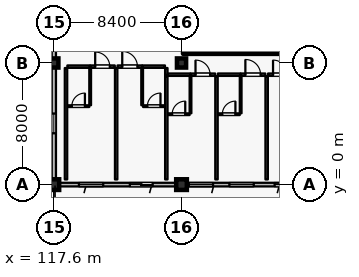
"""IFC4 building model, lengths in metres.
Left out: names, types, materials, properties, quantities, classifications, styles, units other than length and angle.
Written with IfcOpenShell. Run it as: python <this file> out.ifc"""

import sys

from ifc_helpers import new_model, si_unit, direction, frame, frame_2d, origin, origin_2d, place, context, subcontext, project, spatial, rectangle, hollow_rectangle, extrude, element, fill, save


model = new_model("IFC4")
c1 = context("Model", 3, precision=1e-05, world=origin(), true_north=direction((0.0, 1.0)))
c2 = subcontext(c1, "Body", "Model", "MODEL_VIEW")
j1 = project(units=[si_unit("LENGTHUNIT", "METRE"), si_unit("PLANEANGLEUNIT", "RADIAN")], contexts=[c1])
p1 = place(None, origin())
s1 = spatial("IfcSite", under=j1, at=p1, CompositionType="ELEMENT")
p2 = place(p1, origin())
s2 = spatial("IfcBuilding", under=s1, at=p2, CompositionType="ELEMENT")
p3 = place(p2, frame((0.0, 0.0, 32.4)))
s3 = spatial("IfcBuildingStorey", under=s2, at=p3, CompositionType="ELEMENT", Elevation=32.4)
for number, where, z_axis, x_axis in (
    (1, (117.6, 0.0, 0.0), (0.0, 0.0, 1.0), (1.0, 0.0, 0.0)),
    (2, (126.0, 0.0, 0.0), (0.0, 0.0, 1.0), (1.0, 0.0, 0.0)),
):
    element("IfcColumn", number, at=place(p3, frame(where, z_axis=z_axis, x_axis=x_axis)), inside=s3, PredefinedType="COLUMN", context=c2, shape_type="SweptSolid", body=[
        extrude(rectangle(XDim=0.7, YDim=0.7, at=origin_2d()), origin(), (0.0, 0.0, 1.0), 3.6),
    ])
for number, where, z_axis, x_axis in (
    (3, (117.6, 8.0, 0.0), (0.0, 0.0, 1.0), (1.0, 0.0, 0.0)),
    (4, (126.0, 8.0, 0.0), (0.0, 0.0, 1.0), (1.0, 0.0, 0.0)),
):
    element("IfcColumn", number, at=place(p3, frame(where, z_axis=z_axis, x_axis=x_axis)), inside=s3, PredefinedType="COLUMN", context=c2, shape_type="SweptSolid", body=[
        extrude(rectangle(XDim=0.6, YDim=0.6, at=origin_2d()), origin(), (0.0, 0.0, 1.0), 3.6),
    ])
p4 = place(p3, frame((125.65, 0.0, 0.0), z_axis=(0.0, 0.0, 1.0), x_axis=(-1.0, 0.0, 0.0)))
e5 = element("IfcWall", 5, at=p4, inside=s3, PredefinedType="SOLIDWALL", context=c2, shape_type="SweptSolid", body=[
    extrude(rectangle(XDim=7.7, YDim=0.24, at=frame_2d((3.85, 0.0))), origin(), (0.0, 0.0, 1.0), 2.94),
])
p5 = place(p4, frame((1.55, 0.0, 0.0)))
e6 = element("IfcOpeningElement", 6, at=p5, cuts=e5, PredefinedType="OPENING", context=c2, shape_type="SweptSolid", body=[
    extrude(rectangle(XDim=1.5, YDim=2.25, at=frame_2d((0.75, 1.125))), frame((0.0, 0.13, 0.0), z_axis=(0.0, -1.0, 0.0), x_axis=(1.0, 0.0, 0.0)), (0.0, 0.0, 1.0), 0.26),
])
p6 = place(p4, frame((4.8, 0.0, 0.8)))
e7 = element("IfcOpeningElement", 7, at=p6, cuts=e5, PredefinedType="OPENING", context=c2, shape_type="SweptSolid", body=[
    extrude(rectangle(XDim=1.6, YDim=1.6, at=frame_2d((0.8, 0.8))), frame((0.0, 0.13, 0.0), z_axis=(0.0, -1.0, 0.0), x_axis=(1.0, 0.0, 0.0)), (0.0, 0.0, 1.0), 0.26),
])
p7 = place(p3, frame((134.05, 0.0, 0.0), z_axis=(0.0, 0.0, 1.0), x_axis=(-1.0, 0.0, 0.0)))
e8 = element("IfcWall", 8, at=p7, inside=s3, PredefinedType="SOLIDWALL", context=c2, shape_type="SweptSolid", body=[
    extrude(rectangle(XDim=7.7, YDim=0.24, at=frame_2d((3.85, 0.0))), origin(), (0.0, 0.0, 1.0), 2.94),
])
p8 = place(p7, frame((0.425, 0.0, 0.0)))
e9 = element("IfcOpeningElement", 9, at=p8, cuts=e8, PredefinedType="OPENING", context=c2, shape_type="SweptSolid", body=[
    extrude(rectangle(XDim=1.5, YDim=2.25, at=frame_2d((0.75, 1.125))), frame((0.0, 0.13, 0.0), z_axis=(0.0, -1.0, 0.0), x_axis=(1.0, 0.0, 0.0)), (0.0, 0.0, 1.0), 0.26),
])
p9 = place(p7, frame((3.3, 0.0, 0.8)))
e10 = element("IfcOpeningElement", 10, at=p9, cuts=e8, PredefinedType="OPENING", context=c2, shape_type="SweptSolid", body=[
    extrude(rectangle(XDim=1.6, YDim=1.6, at=frame_2d((0.8, 0.8))), frame((0.0, 0.13, 0.0), z_axis=(0.0, -1.0, 0.0), x_axis=(1.0, 0.0, 0.0)), (0.0, 0.0, 1.0), 0.26),
])
p10 = place(p7, frame((5.975, 0.0, 0.8)))
e11 = element("IfcOpeningElement", 11, at=p10, cuts=e8, PredefinedType="OPENING", context=c2, shape_type="SweptSolid", body=[
    extrude(rectangle(XDim=1.6, YDim=1.6, at=frame_2d((0.8, 0.8))), frame((0.0, 0.13, 0.0), z_axis=(0.0, -1.0, 0.0), x_axis=(1.0, 0.0, 0.0)), (0.0, 0.0, 1.0), 0.26),
])
p11 = place(p3, frame((117.6, 0.35, 0.0), z_axis=(0.0, 0.0, 1.0), x_axis=(0.0, 1.0, 0.0)))
e12 = element("IfcWall", 12, at=p11, inside=s3, PredefinedType="SOLIDWALL", context=c2, shape_type="SweptSolid", body=[
    extrude(rectangle(XDim=7.35, YDim=0.28, at=frame_2d((3.675, 0.0))), origin(), (0.0, 0.0, 1.0), 2.7),
])
p12 = place(p11, frame((3.025, 0.0, 0.5)))
e13 = element("IfcOpeningElement", 13, at=p12, cuts=e12, PredefinedType="OPENING", context=c2, shape_type="SweptSolid", body=[
    extrude(rectangle(XDim=1.3, YDim=1.65, at=frame_2d((0.65, 0.825))), frame((0.0, 0.15, 0.0), z_axis=(0.0, -1.0, 0.0), x_axis=(1.0, 0.0, 0.0)), (0.0, 0.0, 1.0), 0.3),
])
p13 = place(p3, frame((117.6, 8.3, 0.0), z_axis=(0.0, 0.0, 1.0), x_axis=(0.0, 1.0, 0.0)))
e14 = element("IfcWall", 14, at=p13, inside=s3, PredefinedType="SOLIDWALL", context=c2, shape_type="SweptSolid", body=[
    extrude(rectangle(XDim=7.35, YDim=0.28, at=frame_2d((3.675, 0.0))), origin(), (0.0, 0.0, 1.0), 2.7),
])
p14 = place(p13, frame((3.025, 0.0, 0.5)))
e15 = element("IfcOpeningElement", 15, at=p14, cuts=e14, PredefinedType="OPENING", context=c2, shape_type="SweptSolid", body=[
    extrude(rectangle(XDim=1.3, YDim=1.65, at=frame_2d((0.65, 0.825))), frame((0.0, 0.15, 0.0), z_axis=(0.0, -1.0, 0.0), x_axis=(1.0, 0.0, 0.0)), (0.0, 0.0, 1.0), 0.3),
])
p15 = place(p3, frame((126.1, 8.8, 0.0), z_axis=(0.0, 0.0, 1.0), x_axis=(1.0, 0.0, 0.0)))
e16 = element("IfcWall", 16, at=p15, inside=s3, PredefinedType="SHEAR", context=c2, shape_type="SweptSolid", body=[
    extrude(rectangle(XDim=8.2, YDim=0.4, at=frame_2d((4.1, 0.0))), origin(), (0.0, 0.0, 1.0), 3.335),
])
for number, where, z_axis, x_axis in (
    (17, (126.48, 8.8, 0.0), (0.0, 0.0, 1.0), (1.0, 0.0, 0.0)),
    (18, (127.74, 8.8, 0.0), (0.0, 0.0, 1.0), (1.0, 0.0, 0.0)),
):
    element("IfcColumn", number, at=place(p3, frame(where, z_axis=z_axis, x_axis=x_axis)), inside=s3, PredefinedType="COLUMN", context=c2, shape_type="SweptSolid", body=[
        extrude(hollow_rectangle(XDim=0.3, YDim=0.3, WallThickness=0.012, at=origin_2d()), origin(), (0.0, 0.0, 1.0), 3.42),
    ])
p16 = place(p3, frame((118.49, 7.76, 0.0), z_axis=(0.0, 0.0, 1.0), x_axis=(1.0, 0.0, 0.0)))
e19 = element("IfcWall", 19, at=p16, inside=s3, PredefinedType="PARTITIONING", context=c2, shape_type="SweptSolid", body=[
    extrude(rectangle(XDim=1.49, YDim=0.16, at=frame_2d((0.745, 0.0))), origin(), (0.0, 0.0, 1.0), 3.335),
])
p17 = place(p3, frame((119.99, 7.76, 0.0), z_axis=(0.0, 0.0, 1.0), x_axis=(1.0, 0.0, 0.0)))
e20 = element("IfcWall", 20, at=p17, inside=s3, PredefinedType="PARTITIONING", context=c2, shape_type="SweptSolid", body=[
    extrude(rectangle(XDim=1.62, YDim=0.16, at=frame_2d((0.81, 0.0))), origin(), (0.0, 0.0, 1.0), 3.335),
])
p18 = place(p17, frame((0.33, 0.0, 0.0)))
e21 = element("IfcOpeningElement", 21, at=p18, cuts=e20, PredefinedType="OPENING", context=c2, shape_type="SweptSolid", body=[
    extrude(rectangle(XDim=0.96, YDim=2.2, at=frame_2d((0.48, 1.1))), frame((0.0, 0.09, 0.0), z_axis=(0.0, -1.0, 0.0), x_axis=(1.0, 0.0, 0.0)), (0.0, 0.0, 1.0), 0.18),
])
p19 = place(p3, frame((119.99, 5.22, 0.0), z_axis=(0.0, 0.0, 1.0), x_axis=(0.0, 1.0, 0.0)))
e22 = element("IfcWall", 22, at=p19, inside=s3, PredefinedType="PARTITIONING", context=c2, shape_type="SweptSolid", body=[
    extrude(rectangle(XDim=2.45, YDim=0.115, at=frame_2d((1.225, 0.0))), origin(), (0.0, 0.0, 1.0), 3.335),
])
p20 = place(p3, frame((118.5, 5.16, 0.0), z_axis=(0.0, 0.0, 1.0), x_axis=(1.0, 0.0, 0.0)))
e23 = element("IfcWall", 23, at=p20, inside=s3, PredefinedType="PARTITIONING", context=c2, shape_type="SweptSolid", body=[
    extrude(rectangle(XDim=1.43, YDim=0.115, at=frame_2d((0.715, 0.0))), origin(), (0.0, 0.0, 1.0), 3.335),
])
p21 = place(p20, frame((0.285, 0.0, 0.0)))
e24 = element("IfcOpeningElement", 24, at=p21, cuts=e23, PredefinedType="OPENING", context=c2, shape_type="SweptSolid", body=[
    extrude(rectangle(XDim=0.86, YDim=2.12, at=frame_2d((0.43, 1.06))), frame((0.0, 0.067, 0.0), z_axis=(0.0, -1.0, 0.0), x_axis=(1.0, 0.0, 0.0)), (0.0, 0.0, 1.0), 0.135),
])
p22 = place(p3, frame((118.4, 0.34, 0.0), z_axis=(0.0, 0.0, 1.0), x_axis=(0.0, 1.0, 0.0)))
e25 = element("IfcWall", 25, at=p22, inside=s3, PredefinedType="PARTITIONING", context=c2, shape_type="SweptSolid", body=[
    extrude(rectangle(XDim=7.33, YDim=0.16, at=frame_2d((3.665, 0.0))), origin(), (0.0, 0.0, 1.0), 3.335),
])
p23 = place(p3, frame((121.79, 7.76, 0.0), z_axis=(0.0, 0.0, 1.0), x_axis=(1.0, 0.0, 0.0)))
e26 = element("IfcWall", 26, at=p23, inside=s3, PredefinedType="PARTITIONING", context=c2, shape_type="SweptSolid", body=[
    extrude(rectangle(XDim=1.62, YDim=0.16, at=frame_2d((0.81, 0.0))), origin(), (0.0, 0.0, 1.0), 3.335),
])
p24 = place(p23, frame((0.31, 0.0, 0.0)))
e27 = element("IfcOpeningElement", 27, at=p24, cuts=e26, PredefinedType="OPENING", context=c2, shape_type="SweptSolid", body=[
    extrude(rectangle(XDim=1.0, YDim=2.25, at=frame_2d((0.5, 1.125))), frame((0.0, 0.09, 0.0), z_axis=(0.0, -1.0, 0.0), x_axis=(1.0, 0.0, 0.0)), (0.0, 0.0, 1.0), 0.18),
])
p25 = place(p3, frame((123.42, 7.76, 0.0), z_axis=(0.0, 0.0, 1.0), x_axis=(1.0, 0.0, 0.0)))
e28 = element("IfcWall", 28, at=p25, inside=s3, PredefinedType="PARTITIONING", context=c2, shape_type="SweptSolid", body=[
    extrude(rectangle(XDim=1.49, YDim=0.16, at=frame_2d((0.745, 0.0))), origin(), (0.0, 0.0, 1.0), 3.335),
])
p26 = place(p3, frame((123.41, 5.22, 0.0), z_axis=(0.0, 0.0, 1.0), x_axis=(0.0, 1.0, 0.0)))
e29 = element("IfcWall", 29, at=p26, inside=s3, PredefinedType="PARTITIONING", context=c2, shape_type="SweptSolid", body=[
    extrude(rectangle(XDim=2.45, YDim=0.115, at=frame_2d((1.225, 0.0))), origin(), (0.0, 0.0, 1.0), 3.335),
])
p27 = place(p3, frame((123.47, 5.16, 0.0), z_axis=(0.0, 0.0, 1.0), x_axis=(1.0, 0.0, 0.0)))
e30 = element("IfcWall", 30, at=p27, inside=s3, PredefinedType="PARTITIONING", context=c2, shape_type="SweptSolid", body=[
    extrude(rectangle(XDim=1.43, YDim=0.115, at=frame_2d((0.715, 0.0))), origin(), (0.0, 0.0, 1.0), 3.335),
])
p28 = place(p27, frame((0.285, 0.0, 0.0)))
e31 = element("IfcOpeningElement", 31, at=p28, cuts=e30, PredefinedType="OPENING", context=c2, shape_type="SweptSolid", body=[
    extrude(rectangle(XDim=0.86, YDim=2.12, at=frame_2d((0.43, 1.06))), frame((0.0, 0.067, 0.0), z_axis=(0.0, -1.0, 0.0), x_axis=(1.0, 0.0, 0.0)), (0.0, 0.0, 1.0), 0.135),
])
p29 = place(p3, frame((121.7, 0.34, 0.0), z_axis=(0.0, 0.0, 1.0), x_axis=(0.0, 1.0, 0.0)))
e32 = element("IfcWall", 32, at=p29, inside=s3, PredefinedType="PARTITIONING", context=c2, shape_type="SweptSolid", body=[
    extrude(rectangle(XDim=7.33, YDim=0.16, at=frame_2d((3.665, 0.0))), origin(), (0.0, 0.0, 1.0), 3.335),
])
p30 = place(p3, frame((125.0, 7.15, 0.0), z_axis=(0.0, 0.0, 1.0), x_axis=(0.0, 1.0, 0.0)))
e33 = element("IfcWall", 33, at=p30, inside=s3, PredefinedType="PARTITIONING", context=c2, shape_type="SweptSolid", body=[
    extrude(rectangle(XDim=0.52, YDim=0.16, at=frame_2d((0.26, 0.0))), origin(), (0.0, 0.0, 1.0), 3.335),
])
p31 = place(p3, frame((125.09, 7.23, 0.0), z_axis=(0.0, 0.0, 1.0), x_axis=(1.0, 0.0, 0.0)))
e34 = element("IfcWall", 34, at=p31, inside=s3, PredefinedType="PARTITIONING", context=c2, shape_type="SweptSolid", body=[
    extrude(rectangle(XDim=1.49, YDim=0.16, at=frame_2d((0.745, 0.0))), origin(), (0.0, 0.0, 1.0), 3.335),
])
p32 = place(p3, frame((126.59, 7.23, 0.0), z_axis=(0.0, 0.0, 1.0), x_axis=(1.0, 0.0, 0.0)))
e35 = element("IfcWall", 35, at=p32, inside=s3, PredefinedType="PARTITIONING", context=c2, shape_type="SweptSolid", body=[
    extrude(rectangle(XDim=1.62, YDim=0.16, at=frame_2d((0.81, 0.0))), origin(), (0.0, 0.0, 1.0), 3.335),
])
p33 = place(p32, frame((0.33, 0.0, 0.0)))
e36 = element("IfcOpeningElement", 36, at=p33, cuts=e35, PredefinedType="OPENING", context=c2, shape_type="SweptSolid", body=[
    extrude(rectangle(XDim=0.96, YDim=2.2, at=frame_2d((0.48, 1.1))), frame((0.0, 0.09, 0.0), z_axis=(0.0, -1.0, 0.0), x_axis=(1.0, 0.0, 0.0)), (0.0, 0.0, 1.0), 0.18),
])
p34 = place(p3, frame((126.59, 4.69, 0.0), z_axis=(0.0, 0.0, 1.0), x_axis=(0.0, 1.0, 0.0)))
e37 = element("IfcWall", 37, at=p34, inside=s3, PredefinedType="PARTITIONING", context=c2, shape_type="SweptSolid", body=[
    extrude(rectangle(XDim=2.45, YDim=0.115, at=frame_2d((1.225, 0.0))), origin(), (0.0, 0.0, 1.0), 3.335),
])
p35 = place(p3, frame((125.1, 4.63, 0.0), z_axis=(0.0, 0.0, 1.0), x_axis=(1.0, 0.0, 0.0)))
e38 = element("IfcWall", 38, at=p35, inside=s3, PredefinedType="PARTITIONING", context=c2, shape_type="SweptSolid", body=[
    extrude(rectangle(XDim=1.43, YDim=0.115, at=frame_2d((0.715, 0.0))), origin(), (0.0, 0.0, 1.0), 3.335),
])
p36 = place(p35, frame((0.285, 0.0, 0.0)))
e39 = element("IfcOpeningElement", 39, at=p36, cuts=e38, PredefinedType="OPENING", context=c2, shape_type="SweptSolid", body=[
    extrude(rectangle(XDim=0.86, YDim=2.12, at=frame_2d((0.43, 1.06))), frame((0.0, 0.067, 0.0), z_axis=(0.0, -1.0, 0.0), x_axis=(1.0, 0.0, 0.0)), (0.0, 0.0, 1.0), 0.135),
])
p37 = place(p3, frame((125.0, 0.34, 0.0), z_axis=(0.0, 0.0, 1.0), x_axis=(0.0, 1.0, 0.0)))
e40 = element("IfcWall", 40, at=p37, inside=s3, PredefinedType="PARTITIONING", context=c2, shape_type="SweptSolid", body=[
    extrude(rectangle(XDim=6.8, YDim=0.16, at=frame_2d((3.4, 0.0))), origin(), (0.0, 0.0, 1.0), 3.335),
])
p38 = place(p3, frame((128.39, 7.23, 0.0), z_axis=(0.0, 0.0, 1.0), x_axis=(1.0, 0.0, 0.0)))
e41 = element("IfcWall", 41, at=p38, inside=s3, PredefinedType="PARTITIONING", context=c2, shape_type="SweptSolid", body=[
    extrude(rectangle(XDim=1.49, YDim=0.16, at=frame_2d((0.745, 0.0))), origin(), (0.0, 0.0, 1.0), 3.335),
])
p39 = place(p3, frame((129.89, 7.23, 0.0), z_axis=(0.0, 0.0, 1.0), x_axis=(1.0, 0.0, 0.0)))
e42 = element("IfcWall", 42, at=p39, inside=s3, PredefinedType="PARTITIONING", context=c2, shape_type="SweptSolid", body=[
    extrude(rectangle(XDim=1.62, YDim=0.16, at=frame_2d((0.81, 0.0))), origin(), (0.0, 0.0, 1.0), 3.335),
])
p40 = place(p39, frame((0.31, 0.0, 0.0)))
e43 = element("IfcOpeningElement", 43, at=p40, cuts=e42, PredefinedType="OPENING", context=c2, shape_type="SweptSolid", body=[
    extrude(rectangle(XDim=1.0, YDim=2.25, at=frame_2d((0.5, 1.125))), frame((0.0, 0.09, 0.0), z_axis=(0.0, -1.0, 0.0), x_axis=(1.0, 0.0, 0.0)), (0.0, 0.0, 1.0), 0.18),
])
p41 = place(p3, frame((129.89, 4.69, 0.0), z_axis=(0.0, 0.0, 1.0), x_axis=(0.0, 1.0, 0.0)))
e44 = element("IfcWall", 44, at=p41, inside=s3, PredefinedType="PARTITIONING", context=c2, shape_type="SweptSolid", body=[
    extrude(rectangle(XDim=2.45, YDim=0.115, at=frame_2d((1.225, 0.0))), origin(), (0.0, 0.0, 1.0), 3.335),
])
p42 = place(p3, frame((128.4, 4.63, 0.0), z_axis=(0.0, 0.0, 1.0), x_axis=(1.0, 0.0, 0.0)))
e45 = element("IfcWall", 45, at=p42, inside=s3, PredefinedType="PARTITIONING", context=c2, shape_type="SweptSolid", body=[
    extrude(rectangle(XDim=1.43, YDim=0.115, at=frame_2d((0.715, 0.0))), origin(), (0.0, 0.0, 1.0), 3.335),
])
p43 = place(p42, frame((0.285, 0.0, 0.0)))
e46 = element("IfcOpeningElement", 46, at=p43, cuts=e45, PredefinedType="OPENING", context=c2, shape_type="SweptSolid", body=[
    extrude(rectangle(XDim=0.86, YDim=2.12, at=frame_2d((0.43, 1.06))), frame((0.0, 0.067, 0.0), z_axis=(0.0, -1.0, 0.0), x_axis=(1.0, 0.0, 0.0)), (0.0, 0.0, 1.0), 0.135),
])
p44 = place(p3, frame((128.3, 0.34, 0.0), z_axis=(0.0, 0.0, 1.0), x_axis=(0.0, 1.0, 0.0)))
e47 = element("IfcWall", 47, at=p44, inside=s3, PredefinedType="PARTITIONING", context=c2, shape_type="SweptSolid", body=[
    extrude(rectangle(XDim=6.8, YDim=0.16, at=frame_2d((3.4, 0.0))), origin(), (0.0, 0.0, 1.0), 3.335),
])
p45 = place(p3, frame((131.69, 7.23, 0.0), z_axis=(0.0, 0.0, 1.0), x_axis=(1.0, 0.0, 0.0)))
e48 = element("IfcWall", 48, at=p45, inside=s3, PredefinedType="PARTITIONING", context=c2, shape_type="SweptSolid", body=[
    extrude(rectangle(XDim=1.62, YDim=0.16, at=frame_2d((0.81, 0.0))), origin(), (0.0, 0.0, 1.0), 3.335),
])
p46 = place(p45, frame((0.33, 0.0, 0.0)))
e49 = element("IfcOpeningElement", 49, at=p46, cuts=e48, PredefinedType="OPENING", context=c2, shape_type="SweptSolid", body=[
    extrude(rectangle(XDim=0.96, YDim=2.2, at=frame_2d((0.48, 1.1))), frame((0.0, 0.09, 0.0), z_axis=(0.0, -1.0, 0.0), x_axis=(1.0, 0.0, 0.0)), (0.0, 0.0, 1.0), 0.18),
])
p47 = place(p3, frame((131.6, 0.34, 0.0), z_axis=(0.0, 0.0, 1.0), x_axis=(0.0, 1.0, 0.0)))
e50 = element("IfcWall", 50, at=p47, inside=s3, PredefinedType="PARTITIONING", context=c2, shape_type="SweptSolid", body=[
    extrude(rectangle(XDim=6.8, YDim=0.16, at=frame_2d((3.4, 0.0))), origin(), (0.0, 0.0, 1.0), 3.335),
])
p48 = place(p5, origin())
e51 = element("IfcDoor", 51, at=p48, inside=s3, OperationType="SLIDING_TO_LEFT", PredefinedType="DOOR", context=c2, shape_type="SweptSolid", body=[
    extrude(rectangle(XDim=1.5, YDim=2.25, at=frame_2d((0.75, 1.125))), frame((0.0, 0.025, 0.0), z_axis=(0.0, -1.0, 0.0), x_axis=(1.0, 0.0, 0.0)), (0.0, 0.0, 1.0), 0.05),
])
fill(e6, e51)
p49 = place(p6, origin())
e52 = element("IfcWindow", 52, at=p49, inside=s3, PartitioningType="SINGLE_PANEL", PredefinedType="WINDOW", context=c2, shape_type="SweptSolid", body=[
    extrude(rectangle(XDim=1.6, YDim=1.6, at=frame_2d((0.8, 0.8))), frame((0.0, 0.03, 0.0), z_axis=(0.0, -1.0, 0.0), x_axis=(1.0, 0.0, 0.0)), (0.0, 0.0, 1.0), 0.06),
])
fill(e7, e52)
p50 = place(p8, origin())
e53 = element("IfcDoor", 53, at=p50, inside=s3, OperationType="SLIDING_TO_LEFT", PredefinedType="DOOR", context=c2, shape_type="SweptSolid", body=[
    extrude(rectangle(XDim=1.5, YDim=2.25, at=frame_2d((0.75, 1.125))), frame((0.0, 0.025, 0.0), z_axis=(0.0, -1.0, 0.0), x_axis=(1.0, 0.0, 0.0)), (0.0, 0.0, 1.0), 0.05),
])
fill(e9, e53)
p51 = place(p9, origin())
e54 = element("IfcWindow", 54, at=p51, inside=s3, PartitioningType="SINGLE_PANEL", PredefinedType="WINDOW", context=c2, shape_type="SweptSolid", body=[
    extrude(rectangle(XDim=1.6, YDim=1.6, at=frame_2d((0.8, 0.8))), frame((0.0, 0.03, 0.0), z_axis=(0.0, -1.0, 0.0), x_axis=(1.0, 0.0, 0.0)), (0.0, 0.0, 1.0), 0.06),
])
fill(e10, e54)
p52 = place(p10, origin())
e55 = element("IfcWindow", 55, at=p52, inside=s3, PartitioningType="SINGLE_PANEL", PredefinedType="WINDOW", context=c2, shape_type="SweptSolid", body=[
    extrude(rectangle(XDim=1.6, YDim=1.6, at=frame_2d((0.8, 0.8))), frame((0.0, 0.03, 0.0), z_axis=(0.0, -1.0, 0.0), x_axis=(1.0, 0.0, 0.0)), (0.0, 0.0, 1.0), 0.06),
])
fill(e11, e55)
p53 = place(p12, origin())
e56 = element("IfcWindow", 56, at=p53, inside=s3, PartitioningType="SINGLE_PANEL", PredefinedType="WINDOW", context=c2, shape_type="SweptSolid", body=[
    extrude(rectangle(XDim=1.3, YDim=1.65, at=frame_2d((0.65, 0.825))), frame((0.0, 0.03, 0.0), z_axis=(0.0, -1.0, 0.0), x_axis=(1.0, 0.0, 0.0)), (0.0, 0.0, 1.0), 0.06),
])
fill(e13, e56)
p54 = place(p18, origin())
e57 = element("IfcDoor", 57, at=p54, inside=s3, OperationType="SINGLE_SWING_LEFT", PredefinedType="DOOR", context=c2, shape_type="SweptSolid", body=[
    extrude(rectangle(XDim=0.96, YDim=2.2, at=frame_2d((0.48, 1.1))), frame((0.0, 0.025, 0.0), z_axis=(0.0, -1.0, 0.0), x_axis=(1.0, 0.0, 0.0)), (0.0, 0.0, 1.0), 0.05),
])
fill(e21, e57)
p55 = place(p21, origin())
e58 = element("IfcDoor", 58, at=p55, inside=s3, OperationType="SINGLE_SWING_RIGHT", PredefinedType="DOOR", context=c2, shape_type="SweptSolid", body=[
    extrude(rectangle(XDim=0.86, YDim=2.12, at=frame_2d((0.43, 1.06))), frame((0.0, 0.025, 0.0), z_axis=(0.0, -1.0, 0.0), x_axis=(1.0, 0.0, 0.0)), (0.0, 0.0, 1.0), 0.05),
])
fill(e24, e58)
p56 = place(p24, origin())
e59 = element("IfcDoor", 59, at=p56, inside=s3, OperationType="SINGLE_SWING_LEFT", PredefinedType="DOOR", context=c2, shape_type="SweptSolid", body=[
    extrude(rectangle(XDim=1.0, YDim=2.25, at=frame_2d((0.5, 1.125))), frame((0.0, 0.025, 0.0), z_axis=(0.0, -1.0, 0.0), x_axis=(1.0, 0.0, 0.0)), (0.0, 0.0, 1.0), 0.05),
])
fill(e27, e59)
p57 = place(p28, origin())
e60 = element("IfcDoor", 60, at=p57, inside=s3, OperationType="SINGLE_SWING_RIGHT", PredefinedType="DOOR", context=c2, shape_type="SweptSolid", body=[
    extrude(rectangle(XDim=0.86, YDim=2.12, at=frame_2d((0.43, 1.06))), frame((0.0, 0.025, 0.0), z_axis=(0.0, -1.0, 0.0), x_axis=(1.0, 0.0, 0.0)), (0.0, 0.0, 1.0), 0.05),
])
fill(e31, e60)
p58 = place(p33, origin())
e61 = element("IfcDoor", 61, at=p58, inside=s3, OperationType="SINGLE_SWING_LEFT", PredefinedType="DOOR", context=c2, shape_type="SweptSolid", body=[
    extrude(rectangle(XDim=0.96, YDim=2.2, at=frame_2d((0.48, 1.1))), frame((0.0, 0.025, 0.0), z_axis=(0.0, -1.0, 0.0), x_axis=(1.0, 0.0, 0.0)), (0.0, 0.0, 1.0), 0.05),
])
fill(e36, e61)
p59 = place(p36, origin())
e62 = element("IfcDoor", 62, at=p59, inside=s3, OperationType="SINGLE_SWING_RIGHT", PredefinedType="DOOR", context=c2, shape_type="SweptSolid", body=[
    extrude(rectangle(XDim=0.86, YDim=2.12, at=frame_2d((0.43, 1.06))), frame((0.0, 0.025, 0.0), z_axis=(0.0, -1.0, 0.0), x_axis=(1.0, 0.0, 0.0)), (0.0, 0.0, 1.0), 0.05),
])
fill(e39, e62)
p60 = place(p40, origin())
e63 = element("IfcDoor", 63, at=p60, inside=s3, OperationType="SINGLE_SWING_LEFT", PredefinedType="DOOR", context=c2, shape_type="SweptSolid", body=[
    extrude(rectangle(XDim=1.0, YDim=2.25, at=frame_2d((0.5, 1.125))), frame((0.0, 0.025, 0.0), z_axis=(0.0, -1.0, 0.0), x_axis=(1.0, 0.0, 0.0)), (0.0, 0.0, 1.0), 0.05),
])
fill(e43, e63)
p61 = place(p43, origin())
e64 = element("IfcDoor", 64, at=p61, inside=s3, OperationType="SINGLE_SWING_RIGHT", PredefinedType="DOOR", context=c2, shape_type="SweptSolid", body=[
    extrude(rectangle(XDim=0.86, YDim=2.12, at=frame_2d((0.43, 1.06))), frame((0.0, 0.025, 0.0), z_axis=(0.0, -1.0, 0.0), x_axis=(1.0, 0.0, 0.0)), (0.0, 0.0, 1.0), 0.05),
])
fill(e46, e64)
p62 = place(p46, origin())
e65 = element("IfcDoor", 65, at=p62, inside=s3, OperationType="SINGLE_SWING_LEFT", PredefinedType="DOOR", context=c2, shape_type="SweptSolid", body=[
    extrude(rectangle(XDim=0.96, YDim=2.2, at=frame_2d((0.48, 1.1))), frame((0.0, 0.025, 0.0), z_axis=(0.0, -1.0, 0.0), x_axis=(1.0, 0.0, 0.0)), (0.0, 0.0, 1.0), 0.05),
])
fill(e49, e65)
save(model, sys.argv[1])
